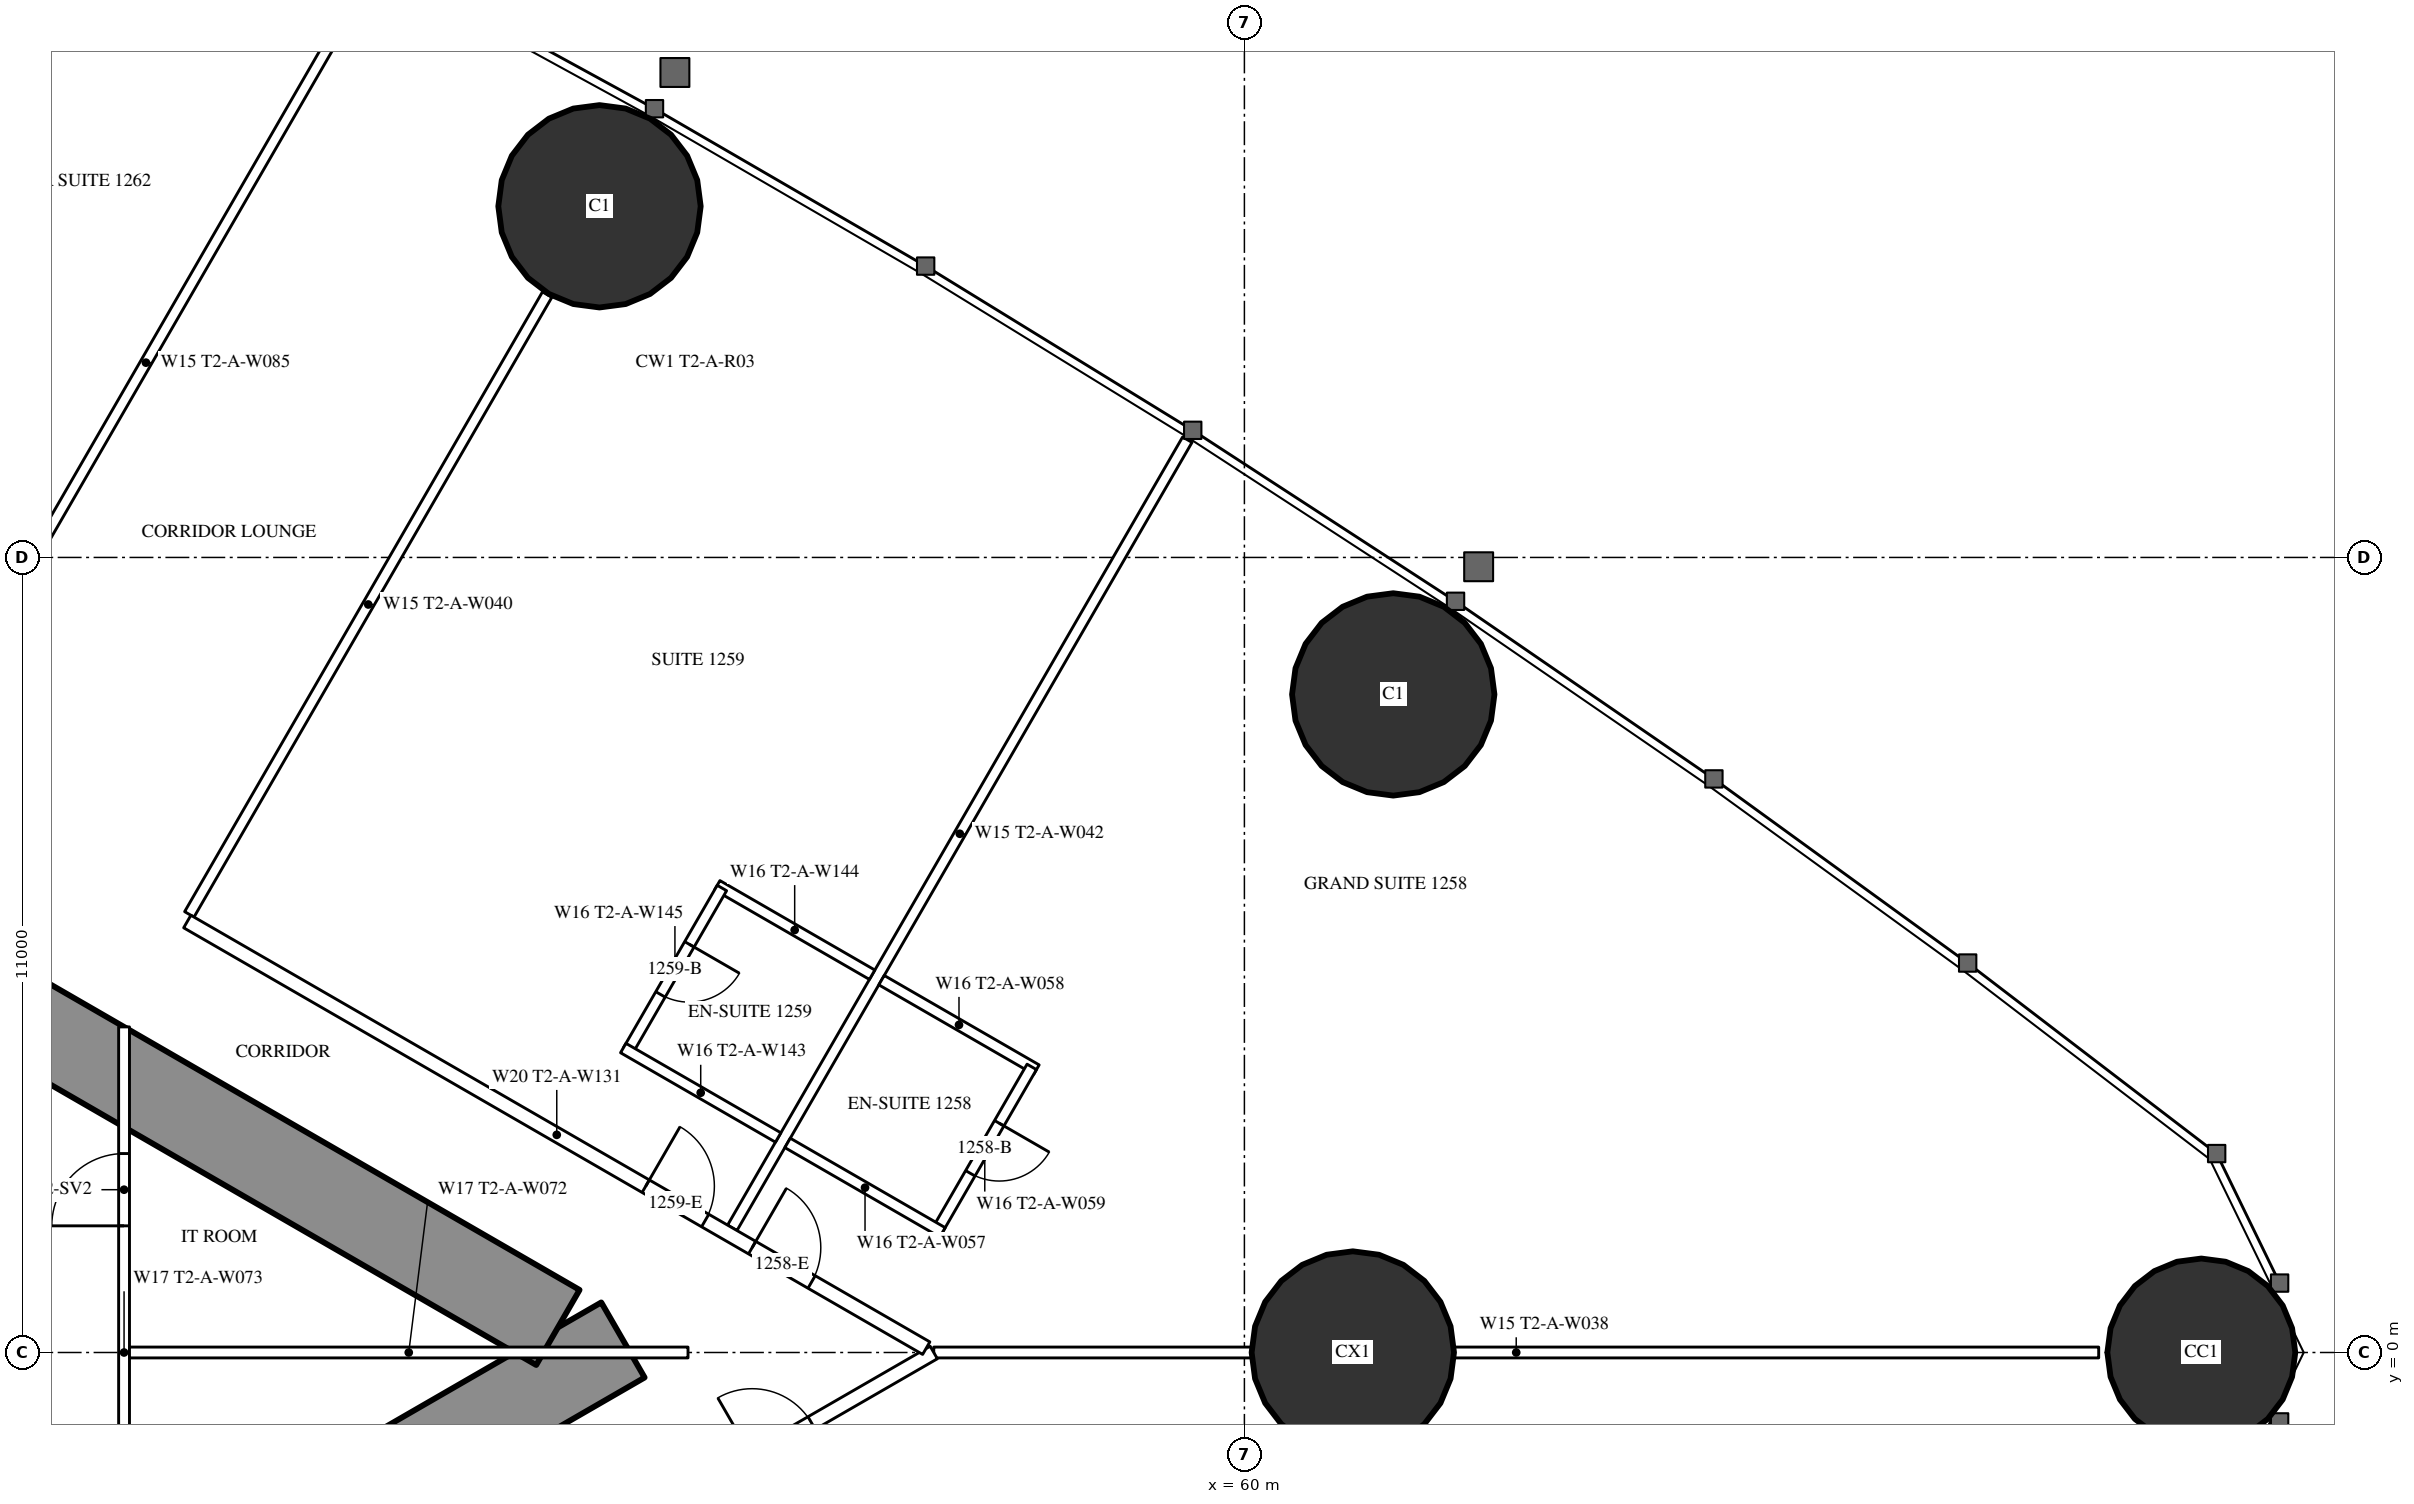
"""IFC4 building model, lengths in metres.
Left out: names, types, materials, properties, quantities, classifications, styles, units other than length and angle.
Written with IfcOpenShell. Run it as: python <this file> out.ifc"""

import sys

from ifc_helpers import new_model, si_unit, direction, frame, frame_2d, origin, origin_2d, place, context, subcontext, project, spatial, rectangle, hollow_circle, extrude, element, fill, save


model = new_model("IFC4")
c1 = context("Model", 3, precision=1e-05, world=origin(), true_north=direction((0.0, 1.0)))
c2 = subcontext(c1, "Body", "Model", "MODEL_VIEW")
j1 = project(units=[si_unit("LENGTHUNIT", "METRE"), si_unit("PLANEANGLEUNIT", "RADIAN")], contexts=[c1])
p1 = place(None, origin())
s1 = spatial("IfcSite", under=j1, at=p1, CompositionType="ELEMENT")
p2 = place(p1, origin())
s2 = spatial("IfcBuilding", under=s1, at=p2, CompositionType="ELEMENT")
p3 = place(p2, frame((0.0, 0.0, 49.5)))
s3 = spatial("IfcBuildingStorey", under=s2, at=p3, CompositionType="ELEMENT", Elevation=49.5)
p4 = place(p3, frame((73.239, 0.0, 0.0), z_axis=(0.0, 0.0, 1.0), x_axis=(1.0, 0.0, 0.0)))
e1 = element("IfcColumn", 1, at=p4, inside=s3, PredefinedType="COLUMN", context=c2, shape_type="SweptSolid", body=[
    extrude(hollow_circle(Radius=1.3, WallThickness=0.1, at=origin_2d()), origin(), (0.0, 0.0, 1.0), 3.5),
])
for number, where, z_axis, x_axis in (
    (2, (62.059, 9.105, 0.0), (0.0, 0.0, 1.0), (1.0, 0.0, 0.0)),
    (3, (51.078, 15.858, 0.0), (0.0, 0.0, 1.0), (1.0, 0.0, 0.0)),
):
    element("IfcColumn", number, at=place(p3, frame(where, z_axis=z_axis, x_axis=x_axis)), inside=s3, PredefinedType="COLUMN", context=c2, shape_type="SweptSolid", body=[
        extrude(hollow_circle(Radius=1.4, WallThickness=0.12, at=origin_2d()), origin(), (0.0, 0.0, 1.0), 3.5),
    ])
p5 = place(p3, frame((61.5, 0.0, 0.0), z_axis=(0.0, 0.0, 1.0), x_axis=(1.0, 0.0, 0.0)))
e4 = element("IfcColumn", 4, at=p5, inside=s3, PredefinedType="COLUMN", context=c2, shape_type="SweptSolid", body=[
    extrude(hollow_circle(Radius=1.4, WallThickness=0.1, at=origin_2d()), origin(), (0.0, 0.0, 1.0), 3.5),
])
p6 = place(p3, frame((27.2, -13.8, 0.0), z_axis=(0.0, 0.0, 1.0), x_axis=(0.866027159892, 0.499996958321, 0.0)))
e5 = element("IfcWall", 5, at=p6, inside=s3, PredefinedType="SHEAR", context=c2, shape_type="SweptSolid", body=[
    extrude(rectangle(XDim=27.947, YDim=1.2, at=frame_2d((13.973, 0.0))), origin(), (0.0, 0.0, 1.0), 3.5),
])
p7 = place(p6, frame((4.6, 0.0, 0.0)))
e6 = element("IfcOpeningElement", 6, at=p7, cuts=e5, PredefinedType="OPENING", context=c2, shape_type="SweptSolid", body=[
    extrude(rectangle(XDim=1.0, YDim=2.2, at=frame_2d((0.5, 1.1))), frame((0.0, 0.61, 0.0), z_axis=(0.0, -1.0, 0.0), x_axis=(1.0, 0.0, 0.0)), (0.0, 0.0, 1.0), 1.22),
])
p8 = place(p6, frame((13.395, 0.0, 0.0)))
e7 = element("IfcOpeningElement", 7, at=p8, cuts=e5, PredefinedType="OPENING", context=c2, shape_type="SweptSolid", body=[
    extrude(rectangle(XDim=1.8, YDim=2.2, at=frame_2d((0.9, 1.1))), frame((0.0, 0.61, 0.0), z_axis=(0.0, -1.0, 0.0), x_axis=(1.0, 0.0, 0.0)), (0.0, 0.0, 1.0), 1.22),
])
p9 = place(p3, frame((27.2, 13.8, 0.0), z_axis=(0.0, 0.0, 1.0), x_axis=(0.866024515034, -0.500001539357, 0.0)))
e8 = element("IfcWall", 8, at=p9, inside=s3, PredefinedType="SHEAR", context=c2, shape_type="SweptSolid", body=[
    extrude(rectangle(XDim=26.907, YDim=1.2, at=frame_2d((13.454, 0.0))), origin(), (0.0, 0.0, 1.0), 3.5),
])
p10 = place(p9, frame((4.6, 0.0, 0.0)))
e9 = element("IfcOpeningElement", 9, at=p10, cuts=e8, PredefinedType="OPENING", context=c2, shape_type="SweptSolid", body=[
    extrude(rectangle(XDim=1.0, YDim=2.2, at=frame_2d((0.5, 1.1))), frame((0.0, 0.61, 0.0), z_axis=(0.0, -1.0, 0.0), x_axis=(1.0, 0.0, 0.0)), (0.0, 0.0, 1.0), 1.22),
])
p11 = place(p9, frame((13.395, 0.0, 0.0)))
e10 = element("IfcOpeningElement", 10, at=p11, cuts=e8, PredefinedType="OPENING", context=c2, shape_type="SweptSolid", body=[
    extrude(rectangle(XDim=1.8, YDim=2.2, at=frame_2d((0.9, 1.1))), frame((0.0, 0.61, 0.0), z_axis=(0.0, -1.0, 0.0), x_axis=(1.0, 0.0, 0.0)), (0.0, 0.0, 1.0), 1.22),
])
p12 = place(p3, frame((41.647, 8.23, 0.0), z_axis=(0.0, 0.0, 1.0), x_axis=(0.49998590462, 0.866033541603, 0.0)))
e11 = element("IfcWall", 11, at=p12, inside=s3, PredefinedType="PARTITIONING", context=c2, shape_type="SweptSolid", body=[
    extrude(rectangle(XDim=12.621, YDim=0.15, at=frame_2d((6.311, 0.0))), origin(), (0.0, 0.0, 1.0), 3.25),
])
p13 = place(p3, frame((45.403, 6.062, 0.0), z_axis=(0.0, 0.0, 1.0), x_axis=(0.500013434677, 0.866017647131, 0.0)))
e12 = element("IfcWall", 12, at=p13, inside=s3, PredefinedType="PARTITIONING", context=c2, shape_type="SweptSolid", body=[
    extrude(rectangle(XDim=9.902, YDim=0.15, at=frame_2d((4.951, 0.0))), origin(), (0.0, 0.0, 1.0), 2.25),
])
p14 = place(p3, frame((52.915, 1.725, 0.0), z_axis=(0.0, 0.0, 1.0), x_axis=(0.499997163113, 0.866027041656, 0.0)))
e13 = element("IfcWall", 13, at=p14, inside=s3, PredefinedType="PARTITIONING", context=c2, shape_type="SweptSolid", body=[
    extrude(rectangle(XDim=12.591, YDim=0.15, at=frame_2d((6.295, 0.0))), origin(), (0.0, 0.0, 1.0), 3.25),
])
p15 = place(p3, frame((55.702, 0.0, 0.0), z_axis=(0.0, 0.0, 1.0), x_axis=(1.0, 0.0, 0.0)))
e14 = element("IfcWall", 14, at=p15, inside=s3, PredefinedType="PARTITIONING", context=c2, shape_type="SweptSolid", body=[
    extrude(rectangle(XDim=16.117, YDim=0.15, at=frame_2d((8.059, 0.0))), origin(), (0.0, 0.0, 1.0), 2.25),
])
p16 = place(p3, frame((37.96, -10.243, 0.0), z_axis=(0.0, 0.0, 1.0), x_axis=(0.866026429433, 0.499998223521, 0.0)))
e15 = element("IfcWall", 15, at=p16, inside=s3, PredefinedType="PARTITIONING", context=c2, shape_type="SweptSolid", body=[
    extrude(rectangle(XDim=20.487, YDim=0.2, at=frame_2d((10.243, 0.0))), origin(), (0.0, 0.0, 1.0), 3.25),
])
p17 = place(p16, frame((6.925, 0.0, 0.0)))
e16 = element("IfcOpeningElement", 16, at=p17, cuts=e15, PredefinedType="OPENING", context=c2, shape_type="SweptSolid", body=[
    extrude(rectangle(XDim=0.95, YDim=2.2, at=frame_2d((0.475, 1.1))), frame((0.0, 0.11, 0.0), z_axis=(0.0, -1.0, 0.0), x_axis=(1.0, 0.0, 0.0)), (0.0, 0.0, 1.0), 0.22),
])
p18 = place(p16, frame((11.549, 0.0, 0.0)))
e17 = element("IfcOpeningElement", 17, at=p18, cuts=e15, PredefinedType="OPENING", context=c2, shape_type="SweptSolid", body=[
    extrude(rectangle(XDim=0.95, YDim=2.2, at=frame_2d((0.475, 1.1))), frame((0.0, 0.11, 0.0), z_axis=(0.0, -1.0, 0.0), x_axis=(1.0, 0.0, 0.0)), (0.0, 0.0, 1.0), 0.22),
])
p19 = place(p16, frame((13.249, 0.0, 0.0)))
e18 = element("IfcOpeningElement", 18, at=p19, cuts=e15, PredefinedType="OPENING", context=c2, shape_type="SweptSolid", body=[
    extrude(rectangle(XDim=0.95, YDim=2.2, at=frame_2d((0.475, 1.1))), frame((0.0, 0.11, 0.0), z_axis=(0.0, -1.0, 0.0), x_axis=(1.0, 0.0, 0.0)), (0.0, 0.0, 1.0), 0.22),
])
p20 = place(p16, frame((17.585, 0.0, 0.0)))
e19 = element("IfcOpeningElement", 19, at=p20, cuts=e15, PredefinedType="OPENING", context=c2, shape_type="SweptSolid", body=[
    extrude(rectangle(XDim=0.95, YDim=2.2, at=frame_2d((0.475, 1.1))), frame((0.0, 0.11, 0.0), z_axis=(0.0, -1.0, 0.0), x_axis=(1.0, 0.0, 0.0)), (0.0, 0.0, 1.0), 0.22),
])
p21 = place(p16, frame((0.6, 0.0, 0.0)))
e20 = element("IfcOpeningElement", 20, at=p21, cuts=e15, PredefinedType="OPENING", context=c2, shape_type="SweptSolid", body=[
    extrude(rectangle(XDim=0.95, YDim=2.2, at=frame_2d((0.475, 1.1))), frame((0.0, 0.11, 0.0), z_axis=(0.0, -1.0, 0.0), x_axis=(1.0, 0.0, 0.0)), (0.0, 0.0, 1.0), 0.22),
])
p22 = place(p3, frame((45.375, 5.963, 0.0), z_axis=(0.0, 0.0, 1.0), x_axis=(0.86603164725, -0.499989185844, 0.0)))
e21 = element("IfcWall", 21, at=p22, inside=s3, PredefinedType="PARTITIONING", context=c2, shape_type="SweptSolid", body=[
    extrude(rectangle(XDim=11.805, YDim=0.2, at=frame_2d((5.903, 0.0))), origin(), (0.0, 0.0, 1.0), 3.25),
])
p23 = place(p22, frame((9.024, 0.0, 0.0)))
e22 = element("IfcOpeningElement", 22, at=p23, cuts=e21, PredefinedType="OPENING", context=c2, shape_type="SweptSolid", body=[
    extrude(rectangle(XDim=0.95, YDim=2.2, at=frame_2d((0.475, 1.1))), frame((0.0, 0.11, 0.0), z_axis=(0.0, -1.0, 0.0), x_axis=(1.0, 0.0, 0.0)), (0.0, 0.0, 1.0), 0.22),
])
p24 = place(p22, frame((7.324, 0.0, 0.0)))
e23 = element("IfcOpeningElement", 23, at=p24, cuts=e21, PredefinedType="OPENING", context=c2, shape_type="SweptSolid", body=[
    extrude(rectangle(XDim=0.95, YDim=2.2, at=frame_2d((0.475, 1.1))), frame((0.0, 0.11, 0.0), z_axis=(0.0, -1.0, 0.0), x_axis=(1.0, 0.0, 0.0)), (0.0, 0.0, 1.0), 0.22),
])
p25 = place(p3, frame((54.98, 5.151, 0.0), z_axis=(0.0, 0.0, 1.0), x_axis=(0.86604923931, -0.499958713387, 0.0)))
e24 = element("IfcWall", 24, at=p25, inside=s3, PredefinedType="PARTITIONING", context=c2, shape_type="SweptSolid", body=[
    extrude(rectangle(XDim=2.475, YDim=0.15, at=frame_2d((1.237, 0.0))), origin(), (0.0, 0.0, 1.0), 3.25),
])
p26 = place(p3, frame((55.758, 1.7, 0.0), z_axis=(0.0, 0.0, 1.0), x_axis=(0.500006934395, 0.866021400173, 0.0)))
e25 = element("IfcWall", 25, at=p26, inside=s3, PredefinedType="PARTITIONING", context=c2, shape_type="SweptSolid", body=[
    extrude(rectangle(XDim=2.6, YDim=0.15, at=frame_2d((1.3, 0.0))), origin(), (0.0, 0.0, 1.0), 3.25),
])
p27 = place(p26, frame((0.9, 0.0, 0.0)))
e26 = element("IfcOpeningElement", 26, at=p27, cuts=e25, PredefinedType="OPENING", context=c2, shape_type="SweptSolid", body=[
    extrude(rectangle(XDim=0.8, YDim=2.2, at=frame_2d((0.4, 1.1))), frame((0.0, 0.085, 0.0), z_axis=(0.0, -1.0, 0.0), x_axis=(1.0, 0.0, 0.0)), (0.0, 0.0, 1.0), 0.17),
])
for number, where, z_axis, x_axis in (
    (27, (53.68, 2.9, 0.0), (0.0, 0.0, 1.0), (0.866, -0.5, 0.0)),
    (28, (52.706, 6.464, 0.0), (0.0, 0.0, 1.0), (0.866, -0.5, 0.0)),
):
    element("IfcWall", number, at=place(p3, frame(where, z_axis=z_axis, x_axis=x_axis)), inside=s3, PredefinedType="PARTITIONING", context=c2, shape_type="SweptSolid", body=[
        extrude(rectangle(XDim=2.475, YDim=0.15, at=frame_2d((1.237, 0.0))), origin(), (0.0, 0.0, 1.0), 3.25),
    ])
p28 = place(p3, frame((51.471, 4.175, 0.0), z_axis=(0.0, 0.0, 1.0), x_axis=(0.500006934395, 0.866021400173, 0.0)))
e29 = element("IfcWall", 29, at=p28, inside=s3, PredefinedType="PARTITIONING", context=c2, shape_type="SweptSolid", body=[
    extrude(rectangle(XDim=2.6, YDim=0.15, at=frame_2d((1.3, 0.0))), origin(), (0.0, 0.0, 1.0), 3.25),
])
p29 = place(p28, frame((0.9, 0.0, 0.0)))
e30 = element("IfcOpeningElement", 30, at=p29, cuts=e29, PredefinedType="OPENING", context=c2, shape_type="SweptSolid", body=[
    extrude(rectangle(XDim=0.8, YDim=2.2, at=frame_2d((0.4, 1.1))), frame((0.0, 0.085, 0.0), z_axis=(0.0, -1.0, 0.0), x_axis=(1.0, 0.0, 0.0)), (0.0, 0.0, 1.0), 0.17),
])
p30 = place(p3, frame((51.406, 4.212, 0.0), z_axis=(0.0, 0.0, 1.0), x_axis=(0.866031185235, -0.4999899861, 0.0)))
e31 = element("IfcWall", 31, at=p30, inside=s3, PredefinedType="PARTITIONING", context=c2, shape_type="SweptSolid", body=[
    extrude(rectangle(XDim=2.475, YDim=0.15, at=frame_2d((1.238, 0.0))), origin(), (0.0, 0.0, 1.0), 3.25),
])
p31 = place(p3, frame((44.5, -4.505, 0.0), z_axis=(0.0, 0.0, 1.0), x_axis=(0.0, 1.0, 0.0)))
e32 = element("IfcWall", 32, at=p31, inside=s3, PredefinedType="PARTITIONING", context=c2, shape_type="SweptSolid", body=[
    extrude(rectangle(XDim=9.009, YDim=0.15, at=frame_2d((4.505, 0.0))), origin(), (0.0, 0.0, 1.0), 2.45),
])
p32 = place(p31, frame((1.752, 0.0, 0.0)))
e33 = element("IfcOpeningElement", 33, at=p32, cuts=e32, PredefinedType="OPENING", context=c2, shape_type="SweptSolid", body=[
    extrude(rectangle(XDim=1.0, YDim=2.2, at=frame_2d((0.5, 1.1))), frame((0.0, 0.085, 0.0), z_axis=(0.0, -1.0, 0.0), x_axis=(1.0, 0.0, 0.0)), (0.0, 0.0, 1.0), 0.17),
])
p33 = place(p31, frame((6.257, 0.0, 0.0)))
e34 = element("IfcOpeningElement", 34, at=p33, cuts=e32, PredefinedType="OPENING", context=c2, shape_type="SweptSolid", body=[
    extrude(rectangle(XDim=1.0, YDim=2.2, at=frame_2d((0.5, 1.1))), frame((0.0, 0.085, 0.0), z_axis=(0.0, -1.0, 0.0), x_axis=(1.0, 0.0, 0.0)), (0.0, 0.0, 1.0), 0.17),
])
p34 = place(p3, frame((44.575, 0.0, 0.0), z_axis=(0.0, 0.0, 1.0), x_axis=(1.0, 0.0, 0.0)))
e35 = element("IfcWall", 35, at=p34, inside=s3, PredefinedType="PARTITIONING", context=c2, shape_type="SweptSolid", body=[
    extrude(rectangle(XDim=7.727, YDim=0.15, at=frame_2d((3.864, 0.0))), origin(), (0.0, 0.0, 1.0), 2.25),
])
p35 = place(p20, origin())
e36 = element("IfcDoor", 36, at=p35, inside=s3, OperationType="SINGLE_SWING_LEFT", PredefinedType="DOOR", context=c2, shape_type="SweptSolid", body=[
    extrude(rectangle(XDim=0.95, YDim=2.2, at=frame_2d((0.475, 1.1))), frame((0.0, 0.025, 0.0), z_axis=(0.0, -1.0, 0.0), x_axis=(1.0, 0.0, 0.0)), (0.0, 0.0, 1.0), 0.05),
])
fill(e19, e36)
p36 = place(p27, origin())
e37 = element("IfcDoor", 37, at=p36, inside=s3, OperationType="SINGLE_SWING_RIGHT", PredefinedType="DOOR", context=c2, shape_type="SweptSolid", body=[
    extrude(rectangle(XDim=0.8, YDim=2.2, at=frame_2d((0.4, 1.1))), frame((0.0, 0.025, 0.0), z_axis=(0.0, -1.0, 0.0), x_axis=(1.0, 0.0, 0.0)), (0.0, 0.0, 1.0), 0.05),
])
fill(e26, e37)
p37 = place(p23, origin())
e38 = element("IfcDoor", 38, at=p37, inside=s3, OperationType="SINGLE_SWING_LEFT", PredefinedType="DOOR", context=c2, shape_type="SweptSolid", body=[
    extrude(rectangle(XDim=0.95, YDim=2.2, at=frame_2d((0.475, 1.1))), frame((0.0, 0.025, 0.0), z_axis=(0.0, -1.0, 0.0), x_axis=(1.0, 0.0, 0.0)), (0.0, 0.0, 1.0), 0.05),
])
fill(e22, e38)
p38 = place(p29, origin())
e39 = element("IfcDoor", 39, at=p38, inside=s3, OperationType="SINGLE_SWING_RIGHT", PredefinedType="DOOR", context=c2, shape_type="SweptSolid", body=[
    extrude(rectangle(XDim=0.8, YDim=2.2, at=frame_2d((0.4, 1.1))), frame((0.0, 0.025, 0.0), z_axis=(0.0, -1.0, 0.0), x_axis=(1.0, 0.0, 0.0)), (0.0, 0.0, 1.0), 0.05),
])
fill(e30, e39)
p39 = place(p24, origin())
e40 = element("IfcDoor", 40, at=p39, inside=s3, OperationType="SINGLE_SWING_LEFT", PredefinedType="DOOR", context=c2, shape_type="SweptSolid", body=[
    extrude(rectangle(XDim=0.95, YDim=2.2, at=frame_2d((0.475, 1.1))), frame((0.0, 0.025, 0.0), z_axis=(0.0, -1.0, 0.0), x_axis=(1.0, 0.0, 0.0)), (0.0, 0.0, 1.0), 0.05),
])
fill(e23, e40)
p40 = place(p33, origin())
e41 = element("IfcDoor", 41, at=p40, inside=s3, OperationType="SINGLE_SWING_LEFT", PredefinedType="DOOR", context=c2, shape_type="SweptSolid", body=[
    extrude(rectangle(XDim=1.0, YDim=2.2, at=frame_2d((0.5, 1.1))), frame((0.0, 0.025, 0.0), z_axis=(0.0, -1.0, 0.0), x_axis=(1.0, 0.0, 0.0)), (0.0, 0.0, 1.0), 0.05),
])
fill(e34, e41)
save(model, sys.argv[1])
